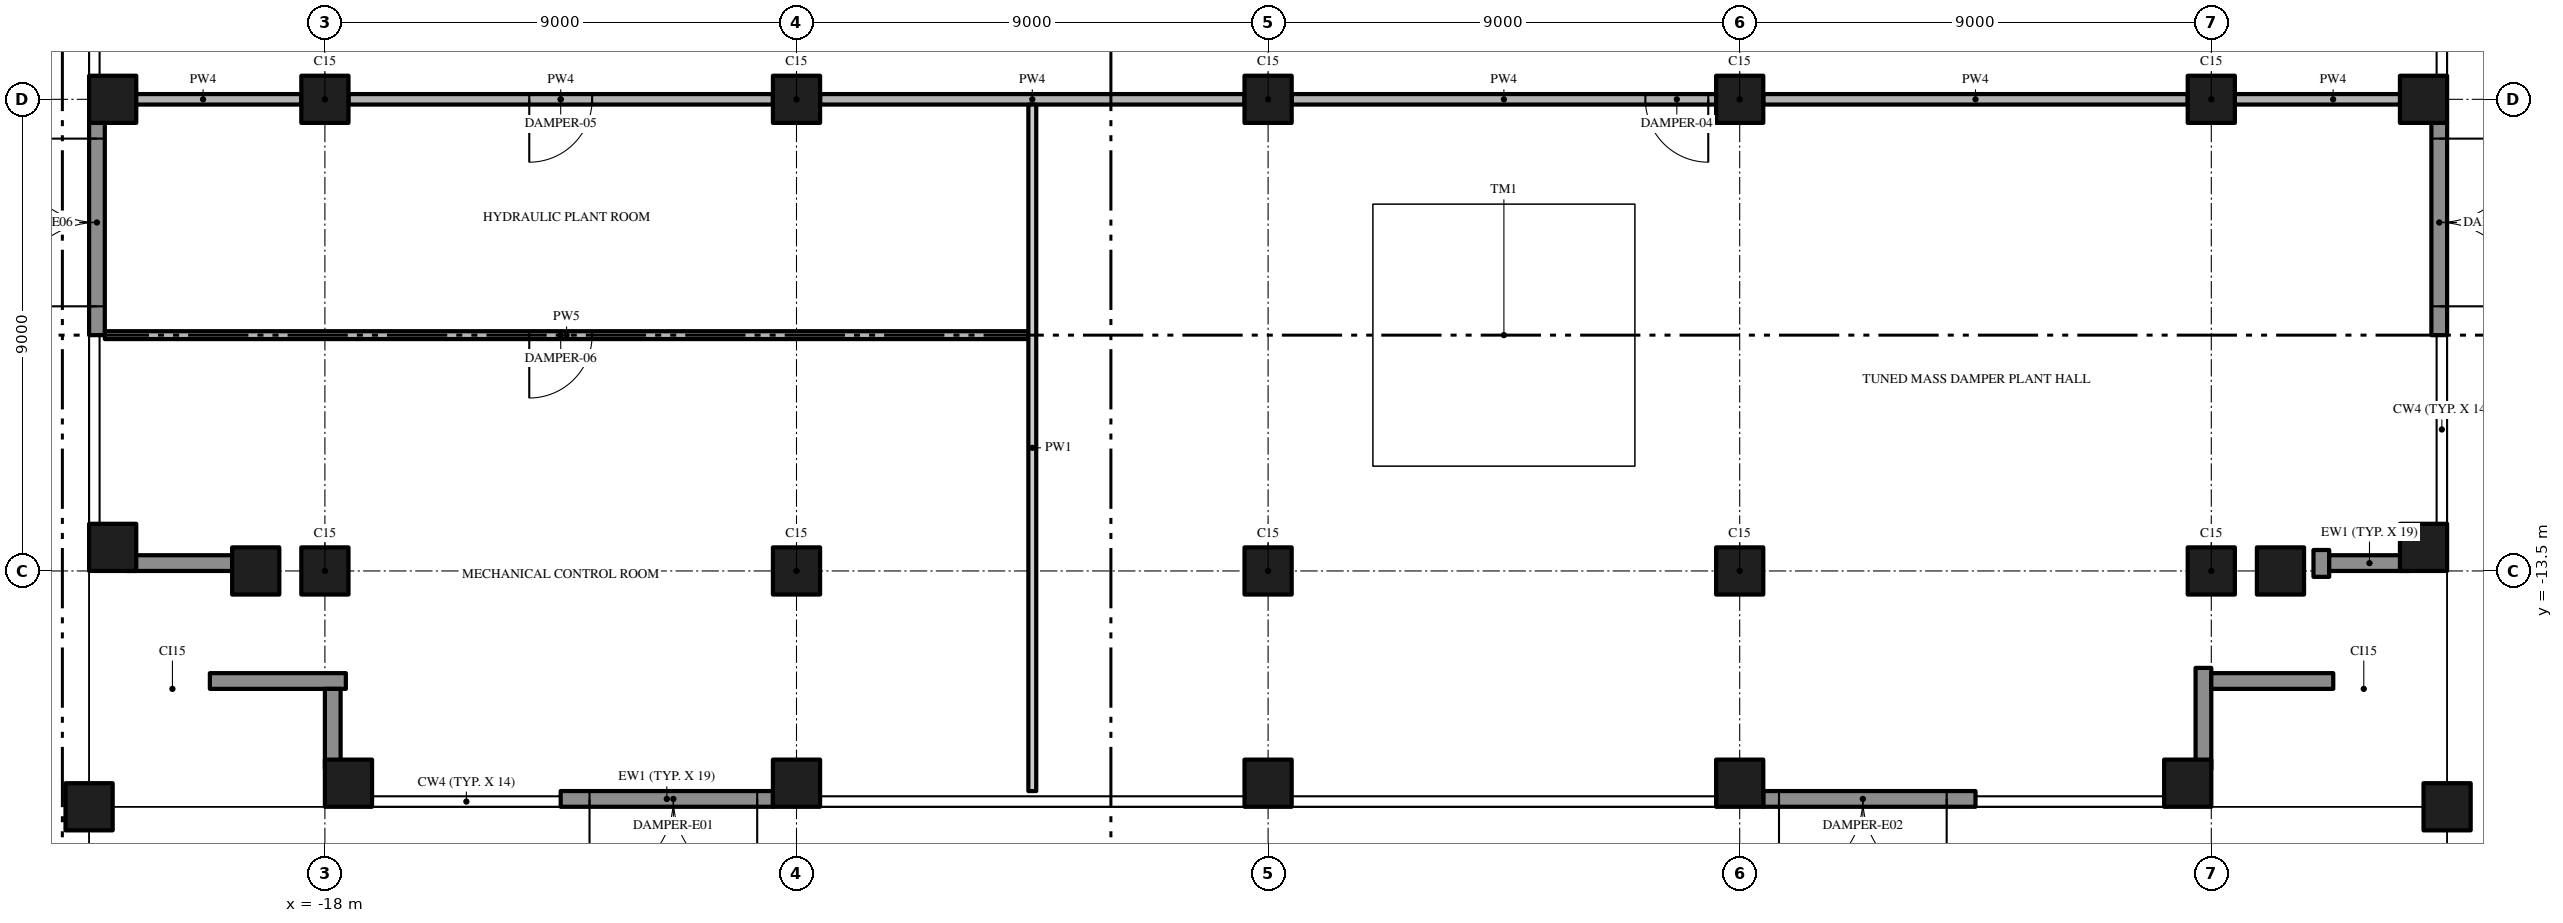
"""IFC4 building model, lengths in metres.
Left out: names, types, materials, properties, quantities, classifications, styles, units other than length and angle.
Written with IfcOpenShell. Run it as: python <this file> out.ifc"""

import sys

from ifc_helpers import new_model, si_unit, direction, frame, frame_2d, origin, origin_2d, place, context, subcontext, project, spatial, rectangle, extrude, element, fill, save


model = new_model("IFC4")
c1 = context("Model", 3, precision=1e-05, world=origin(), true_north=direction((0.0, 1.0)))
c2 = subcontext(c1, "Body", "Model", "MODEL_VIEW")
j1 = project(units=[si_unit("LENGTHUNIT", "METRE"), si_unit("PLANEANGLEUNIT", "RADIAN")], contexts=[c1])
p1 = place(None, origin())
s1 = spatial("IfcSite", under=j1, at=p1, CompositionType="ELEMENT")
p2 = place(p1, origin())
s2 = spatial("IfcBuilding", under=s1, at=p2, CompositionType="ELEMENT")
p3 = place(p2, frame((0.0, 0.0, 289.4)))
s3 = spatial("IfcBuildingStorey", under=s2, at=p3, CompositionType="ELEMENT", Elevation=289.4)
p4 = place(p3, frame((-18.0, -13.5, 0.0), z_axis=(0.0, 0.0, 1.0), x_axis=(1.0, 0.0, 0.0)))
e1 = element("IfcColumn", 1, at=p4, inside=s3, PredefinedType="COLUMN", context=c2, shape_type="SweptSolid", body=[
    extrude(rectangle(XDim=0.9, YDim=0.9, at=origin_2d()), origin(), (0.0, 0.0, 1.0), 7.7),
])
p5 = place(p3, frame((-18.0, -22.05, 0.0), z_axis=(0.050392695604, 0.503926956042, 0.862275013672), x_axis=(-0.99503719021, 0.099503719021, 0.0)))
e2 = element("IfcColumn", 2, at=p5, inside=s3, PredefinedType="COLUMN", context=c2, shape_type="SweptSolid", body=[
    extrude(rectangle(XDim=0.9, YDim=0.9, at=origin_2d()), origin(), (0.0, 0.0, 1.0), 8.93),
])
p6 = place(p3, frame((-18.0, -4.5, 0.0), z_axis=(0.0, 0.0, 1.0), x_axis=(1.0, 0.0, 0.0)))
e3 = element("IfcColumn", 3, at=p6, inside=s3, PredefinedType="COLUMN", context=c2, shape_type="SweptSolid", body=[
    extrude(rectangle(XDim=0.9, YDim=0.9, at=origin_2d()), origin(), (0.0, 0.0, 1.0), 7.7),
])
p7 = place(p3, frame((-26.55, -13.5, 0.0), z_axis=(0.503926956042, 0.050392695604, 0.862275013672), x_axis=(-0.099503719021, 0.99503719021, 0.0)))
e4 = element("IfcColumn", 4, at=p7, inside=s3, PredefinedType="COLUMN", context=c2, shape_type="SweptSolid", body=[
    extrude(rectangle(XDim=0.9, YDim=0.9, at=origin_2d()), origin(), (0.0, 0.0, 1.0), 8.93),
])
p8 = place(p3, frame((-22.5, -18.0, 0.0), z_axis=(0.335850624288, 0.475260317388, 0.813223209753), x_axis=(-0.816665981071, 0.577110626623, 0.0)))
e5 = element("IfcColumn", 5, at=p8, inside=s3, PredefinedType="COLUMN", context=c2, shape_type="SweptSolid", body=[
    extrude(rectangle(XDim=0.9, YDim=0.9, at=origin_2d()), origin(), (0.0, 0.0, 1.0), 9.468),
])
p9 = place(p3, frame((-26.55, -4.5, 0.0), z_axis=(0.504568019295, 0.0, 0.863371944127), x_axis=(0.0, 1.0, 0.0)))
e6 = element("IfcColumn", 6, at=p9, inside=s3, PredefinedType="COLUMN", context=c2, shape_type="SweptSolid", body=[
    extrude(rectangle(XDim=0.9, YDim=0.9, at=origin_2d()), origin(), (0.0, 0.0, 1.0), 8.919),
])
p10 = place(p3, frame((-9.0, -13.5, 0.0), z_axis=(0.0, 0.0, 1.0), x_axis=(1.0, 0.0, 0.0)))
e7 = element("IfcColumn", 7, at=p10, inside=s3, PredefinedType="COLUMN", context=c2, shape_type="SweptSolid", body=[
    extrude(rectangle(XDim=0.9, YDim=0.9, at=origin_2d()), origin(), (0.0, 0.0, 1.0), 7.7),
])
p11 = place(p3, frame((-9.0, -22.05, 0.0), z_axis=(0.0, 0.504568019295, 0.863371944127), x_axis=(-1.0, 0.0, 0.0)))
e8 = element("IfcColumn", 8, at=p11, inside=s3, PredefinedType="COLUMN", context=c2, shape_type="SweptSolid", body=[
    extrude(rectangle(XDim=0.9, YDim=0.9, at=origin_2d()), origin(), (0.0, 0.0, 1.0), 8.919),
])
for number, where, z_axis, x_axis in (
    (9, (-9.0, -4.5, 0.0), (0.0, 0.0, 1.0), (1.0, 0.0, 0.0)),
    (10, (0.0, -13.5, 0.0), (0.0, 0.0, 1.0), (1.0, 0.0, 0.0)),
):
    element("IfcColumn", number, at=place(p3, frame(where, z_axis=z_axis, x_axis=x_axis)), inside=s3, PredefinedType="COLUMN", context=c2, shape_type="SweptSolid", body=[
        extrude(rectangle(XDim=0.9, YDim=0.9, at=origin_2d()), origin(), (0.0, 0.0, 1.0), 7.7),
    ])
p12 = place(p3, frame((0.0, -22.05, 0.0), z_axis=(0.0, 0.504568019295, 0.863371944127), x_axis=(-1.0, 0.0, 0.0)))
e11 = element("IfcColumn", 11, at=p12, inside=s3, PredefinedType="COLUMN", context=c2, shape_type="SweptSolid", body=[
    extrude(rectangle(XDim=0.9, YDim=0.9, at=origin_2d()), origin(), (0.0, 0.0, 1.0), 8.919),
])
for number, where, z_axis, x_axis in (
    (12, (0.0, -4.5, 0.0), (0.0, 0.0, 1.0), (1.0, 0.0, 0.0)),
    (13, (18.0, -13.5, 0.0), (0.0, 0.0, 1.0), (1.0, 0.0, 0.0)),
):
    element("IfcColumn", number, at=place(p3, frame(where, z_axis=z_axis, x_axis=x_axis)), inside=s3, PredefinedType="COLUMN", context=c2, shape_type="SweptSolid", body=[
        extrude(rectangle(XDim=0.9, YDim=0.9, at=origin_2d()), origin(), (0.0, 0.0, 1.0), 7.7),
    ])
p13 = place(p3, frame((18.0, -22.05, 0.0), z_axis=(-0.050392695604, 0.503926956042, 0.862275013672), x_axis=(-0.99503719021, -0.099503719021, 0.0)))
e14 = element("IfcColumn", 14, at=p13, inside=s3, PredefinedType="COLUMN", context=c2, shape_type="SweptSolid", body=[
    extrude(rectangle(XDim=0.9, YDim=0.9, at=origin_2d()), origin(), (0.0, 0.0, 1.0), 8.93),
])
p14 = place(p3, frame((18.0, -4.5, 0.0), z_axis=(0.0, 0.0, 1.0), x_axis=(1.0, 0.0, 0.0)))
e15 = element("IfcColumn", 15, at=p14, inside=s3, PredefinedType="COLUMN", context=c2, shape_type="SweptSolid", body=[
    extrude(rectangle(XDim=0.9, YDim=0.9, at=origin_2d()), origin(), (0.0, 0.0, 1.0), 7.7),
])
p15 = place(p3, frame((26.55, -13.5, 0.0), z_axis=(-0.503926956042, 0.050392695604, 0.862275013672), x_axis=(-0.099503719021, -0.99503719021, 0.0)))
e16 = element("IfcColumn", 16, at=p15, inside=s3, PredefinedType="COLUMN", context=c2, shape_type="SweptSolid", body=[
    extrude(rectangle(XDim=0.9, YDim=0.9, at=origin_2d()), origin(), (0.0, 0.0, 1.0), 8.93),
])
p16 = place(p3, frame((22.5, -18.0, 0.0), z_axis=(-0.335850624288, 0.475260317388, 0.813223209753), x_axis=(-0.816665981071, -0.577110626623, 0.0)))
e17 = element("IfcColumn", 17, at=p16, inside=s3, PredefinedType="COLUMN", context=c2, shape_type="SweptSolid", body=[
    extrude(rectangle(XDim=0.9, YDim=0.9, at=origin_2d()), origin(), (0.0, 0.0, 1.0), 9.468),
])
p17 = place(p3, frame((26.55, -4.5, 0.0), z_axis=(-0.504568019295, 0.0, 0.863371944127), x_axis=(0.0, -1.0, 0.0)))
e18 = element("IfcColumn", 18, at=p17, inside=s3, PredefinedType="COLUMN", context=c2, shape_type="SweptSolid", body=[
    extrude(rectangle(XDim=0.9, YDim=0.9, at=origin_2d()), origin(), (0.0, 0.0, 1.0), 8.919),
])
p18 = place(p3, frame((9.0, -13.5, 0.0), z_axis=(0.0, 0.0, 1.0), x_axis=(1.0, 0.0, 0.0)))
e19 = element("IfcColumn", 19, at=p18, inside=s3, PredefinedType="COLUMN", context=c2, shape_type="SweptSolid", body=[
    extrude(rectangle(XDim=0.9, YDim=0.9, at=origin_2d()), origin(), (0.0, 0.0, 1.0), 7.7),
])
p19 = place(p3, frame((9.0, -22.05, 0.0), z_axis=(0.0, 0.504568019295, 0.863371944127), x_axis=(-1.0, 0.0, 0.0)))
e20 = element("IfcColumn", 20, at=p19, inside=s3, PredefinedType="COLUMN", context=c2, shape_type="SweptSolid", body=[
    extrude(rectangle(XDim=0.9, YDim=0.9, at=origin_2d()), origin(), (0.0, 0.0, 1.0), 8.919),
])
p20 = place(p3, frame((9.0, -4.5, 0.0), z_axis=(0.0, 0.0, 1.0), x_axis=(1.0, 0.0, 0.0)))
e21 = element("IfcColumn", 21, at=p20, inside=s3, PredefinedType="COLUMN", context=c2, shape_type="SweptSolid", body=[
    extrude(rectangle(XDim=0.9, YDim=0.9, at=origin_2d()), origin(), (0.0, 0.0, 1.0), 7.7),
])
p21 = place(p3, frame((-9.45, -17.85, 0.0), z_axis=(0.0, 0.0, 1.0), x_axis=(-1.0, 0.0, 0.0)))
e22 = element("IfcWall", 22, at=p21, inside=s3, PredefinedType="SOLIDWALL", context=c2, shape_type="SweptSolid", body=[
    extrude(rectangle(XDim=4.05, YDim=0.3, at=frame_2d((2.025, 0.0))), origin(), (0.0, 0.0, 1.0), 7.7),
])
p22 = place(p21, frame((0.3, 0.0, 0.0)))
e23 = element("IfcOpeningElement", 23, at=p22, cuts=e22, PredefinedType="OPENING", context=c2, shape_type="SweptSolid", body=[
    extrude(rectangle(XDim=3.2, YDim=2.4, at=frame_2d((1.6, 1.2))), frame((0.0, 0.16, 0.0), z_axis=(0.0, -1.0, 0.0), x_axis=(1.0, 0.0, 0.0)), (0.0, 0.0, 1.0), 0.32),
])
p23 = place(p3, frame((13.5, -17.85, 0.0), z_axis=(0.0, 0.0, 1.0), x_axis=(-1.0, 0.0, 0.0)))
e24 = element("IfcWall", 24, at=p23, inside=s3, PredefinedType="SOLIDWALL", context=c2, shape_type="SweptSolid", body=[
    extrude(rectangle(XDim=4.05, YDim=0.3, at=frame_2d((2.025, 0.0))), origin(), (0.0, 0.0, 1.0), 7.7),
])
p24 = place(p23, frame((0.55, 0.0, 0.0)))
e25 = element("IfcOpeningElement", 25, at=p24, cuts=e24, PredefinedType="OPENING", context=c2, shape_type="SweptSolid", body=[
    extrude(rectangle(XDim=3.2, YDim=2.4, at=frame_2d((1.6, 1.2))), frame((0.0, 0.16, 0.0), z_axis=(0.0, -1.0, 0.0), x_axis=(1.0, 0.0, 0.0)), (0.0, 0.0, 1.0), 0.32),
])
p25 = place(p3, frame((17.85, -15.35, 0.0), z_axis=(0.0, 0.0, 1.0), x_axis=(0.0, -1.0, 0.0)))
e26 = element("IfcWall", 26, at=p25, inside=s3, PredefinedType="SOLIDWALL", context=c2, shape_type="SweptSolid", body=[
    extrude(rectangle(XDim=1.938, YDim=0.3, at=frame_2d((0.969, 0.0))), origin(), (0.0, 0.0, 1.0), 7.7),
])
p26 = place(p3, frame((20.328, -15.6, 0.0), z_axis=(0.0, 0.0, 1.0), x_axis=(-1.0, 0.0, 0.0)))
e27 = element("IfcWall", 27, at=p26, inside=s3, PredefinedType="SOLIDWALL", context=c2, shape_type="SweptSolid", body=[
    extrude(rectangle(XDim=2.328, YDim=0.3, at=frame_2d((1.164, 0.0))), origin(), (0.0, 0.0, 1.0), 7.7),
])
p27 = place(p3, frame((20.1, -13.1, 0.0), z_axis=(0.0, 0.0, 1.0), x_axis=(0.0, -1.0, 0.0)))
e28 = element("IfcWall", 28, at=p27, inside=s3, PredefinedType="SOLIDWALL", context=c2, shape_type="SweptSolid", body=[
    extrude(rectangle(XDim=0.512, YDim=0.3, at=frame_2d((0.256, 0.0))), origin(), (0.0, 0.0, 1.0), 7.7),
])
p28 = place(p3, frame((21.788, -13.35, 0.0), z_axis=(0.0, 0.0, 1.0), x_axis=(-1.0, 0.0, 0.0)))
e29 = element("IfcWall", 29, at=p28, inside=s3, PredefinedType="SOLIDWALL", context=c2, shape_type="SweptSolid", body=[
    extrude(rectangle(XDim=1.538, YDim=0.3, at=frame_2d((0.769, 0.0))), origin(), (0.0, 0.0, 1.0), 7.7),
])
p29 = place(p3, frame((22.35, -4.95, 0.0), z_axis=(0.0, 0.0, 1.0), x_axis=(0.0, -1.0, 0.0)))
e30 = element("IfcWall", 30, at=p29, inside=s3, PredefinedType="SOLIDWALL", context=c2, shape_type="SweptSolid", body=[
    extrude(rectangle(XDim=4.05, YDim=0.3, at=frame_2d((2.025, 0.0))), origin(), (0.0, 0.0, 1.0), 7.7),
])
p30 = place(p29, frame((0.3, 0.0, 0.0)))
e31 = element("IfcOpeningElement", 31, at=p30, cuts=e30, PredefinedType="OPENING", context=c2, shape_type="SweptSolid", body=[
    extrude(rectangle(XDim=3.2, YDim=2.4, at=frame_2d((1.6, 1.2))), frame((0.0, 0.16, 0.0), z_axis=(0.0, -1.0, 0.0), x_axis=(1.0, 0.0, 0.0)), (0.0, 0.0, 1.0), 0.32),
])
p31 = place(p3, frame((-22.35, -9.0, 0.0), z_axis=(0.0, 0.0, 1.0), x_axis=(0.0, 1.0, 0.0)))
e32 = element("IfcWall", 32, at=p31, inside=s3, PredefinedType="SOLIDWALL", context=c2, shape_type="SweptSolid", body=[
    extrude(rectangle(XDim=4.05, YDim=0.3, at=frame_2d((2.025, 0.0))), origin(), (0.0, 0.0, 1.0), 7.7),
])
p32 = place(p31, frame((0.55, 0.0, 0.0)))
e33 = element("IfcOpeningElement", 33, at=p32, cuts=e32, PredefinedType="OPENING", context=c2, shape_type="SweptSolid", body=[
    extrude(rectangle(XDim=3.2, YDim=2.4, at=frame_2d((1.6, 1.2))), frame((0.0, 0.16, 0.0), z_axis=(0.0, -1.0, 0.0), x_axis=(1.0, 0.0, 0.0)), (0.0, 0.0, 1.0), 0.32),
])
p33 = place(p3, frame((-19.77, -13.35, 0.0), z_axis=(0.0, 0.0, 1.0), x_axis=(-1.0, 0.0, 0.0)))
e34 = element("IfcWall", 34, at=p33, inside=s3, PredefinedType="SOLIDWALL", context=c2, shape_type="SweptSolid", body=[
    extrude(rectangle(XDim=2.018, YDim=0.3, at=frame_2d((1.009, 0.0))), origin(), (0.0, 0.0, 1.0), 7.7),
])
p34 = place(p3, frame((-17.6, -15.6, 0.0), z_axis=(0.0, 0.0, 1.0), x_axis=(-1.0, 0.0, 0.0)))
e35 = element("IfcWall", 35, at=p34, inside=s3, PredefinedType="SOLIDWALL", context=c2, shape_type="SweptSolid", body=[
    extrude(rectangle(XDim=2.595, YDim=0.3, at=frame_2d((1.298, 0.0))), origin(), (0.0, 0.0, 1.0), 7.7),
])
p35 = place(p3, frame((-17.85, -17.288, 0.0), z_axis=(0.0, 0.0, 1.0), x_axis=(0.0, 1.0, 0.0)))
e36 = element("IfcWall", 36, at=p35, inside=s3, PredefinedType="SOLIDWALL", context=c2, shape_type="SweptSolid", body=[
    extrude(rectangle(XDim=1.538, YDim=0.3, at=frame_2d((0.769, 0.0))), origin(), (0.0, 0.0, 1.0), 7.7),
])
p36 = place(p3, frame((-4.575, -9.0, 0.0), z_axis=(0.0, 0.0, 1.0), x_axis=(-1.0, 0.0, 0.0)))
e37 = element("IfcWall", 37, at=p36, inside=s3, PredefinedType="PARTITIONING", context=c2, shape_type="SweptSolid", body=[
    extrude(rectangle(XDim=17.625, YDim=0.15, at=frame_2d((8.812, 0.0))), origin(), (0.0, 0.0, 1.0), 7.7),
])
p37 = place(p36, frame((8.325, 0.0, 0.0)))
e38 = element("IfcOpeningElement", 38, at=p37, cuts=e37, PredefinedType="OPENING", context=c2, shape_type="SweptSolid", body=[
    extrude(rectangle(XDim=1.2, YDim=2.4, at=frame_2d((0.6, 1.2))), frame((0.0, 0.085, 0.0), z_axis=(0.0, -1.0, 0.0), x_axis=(1.0, 0.0, 0.0)), (0.0, 0.0, 1.0), 0.17),
])
p38 = place(p3, frame((-22.2, -4.5, 0.0), z_axis=(0.0, 0.0, 1.0), x_axis=(1.0, 0.0, 0.0)))
e39 = element("IfcWall", 39, at=p38, inside=s3, PredefinedType="PARTITIONING", context=c2, shape_type="SweptSolid", body=[
    extrude(rectangle(XDim=3.75, YDim=0.2, at=frame_2d((1.875, 0.0))), origin(), (0.0, 0.0, 1.0), 7.7),
])
p39 = place(p3, frame((-9.45, -4.5, 0.0), z_axis=(0.0, 0.0, 1.0), x_axis=(-1.0, 0.0, 0.0)))
e40 = element("IfcWall", 40, at=p39, inside=s3, PredefinedType="PARTITIONING", context=c2, shape_type="SweptSolid", body=[
    extrude(rectangle(XDim=8.1, YDim=0.2, at=frame_2d((4.05, 0.0))), origin(), (0.0, 0.0, 1.0), 7.7),
])
p40 = place(p39, frame((3.45, 0.0, 0.0)))
e41 = element("IfcOpeningElement", 41, at=p40, cuts=e40, PredefinedType="OPENING", context=c2, shape_type="SweptSolid", body=[
    extrude(rectangle(XDim=1.2, YDim=2.4, at=frame_2d((0.6, 1.2))), frame((0.0, 0.11, 0.0), z_axis=(0.0, -1.0, 0.0), x_axis=(1.0, 0.0, 0.0)), (0.0, 0.0, 1.0), 0.22),
])
p41 = place(p3, frame((-8.55, -4.5, 0.0), z_axis=(0.0, 0.0, 1.0), x_axis=(1.0, 0.0, 0.0)))
e42 = element("IfcWall", 42, at=p41, inside=s3, PredefinedType="PARTITIONING", context=c2, shape_type="SweptSolid", body=[
    extrude(rectangle(XDim=8.1, YDim=0.2, at=frame_2d((4.05, 0.0))), origin(), (0.0, 0.0, 1.0), 7.7),
])
p42 = place(p3, frame((8.55, -4.5, 0.0), z_axis=(0.0, 0.0, 1.0), x_axis=(-1.0, 0.0, 0.0)))
e43 = element("IfcWall", 43, at=p42, inside=s3, PredefinedType="PARTITIONING", context=c2, shape_type="SweptSolid", body=[
    extrude(rectangle(XDim=8.1, YDim=0.2, at=frame_2d((4.05, 0.0))), origin(), (0.0, 0.0, 1.0), 7.7),
])
p43 = place(p42, frame((0.15, 0.0, 0.0)))
e44 = element("IfcOpeningElement", 44, at=p43, cuts=e43, PredefinedType="OPENING", context=c2, shape_type="SweptSolid", body=[
    extrude(rectangle(XDim=1.2, YDim=2.4, at=frame_2d((0.6, 1.2))), frame((0.0, 0.11, 0.0), z_axis=(0.0, -1.0, 0.0), x_axis=(1.0, 0.0, 0.0)), (0.0, 0.0, 1.0), 0.22),
])
p44 = place(p3, frame((9.45, -4.5, 0.0), z_axis=(0.0, 0.0, 1.0), x_axis=(1.0, 0.0, 0.0)))
e45 = element("IfcWall", 45, at=p44, inside=s3, PredefinedType="PARTITIONING", context=c2, shape_type="SweptSolid", body=[
    extrude(rectangle(XDim=8.1, YDim=0.2, at=frame_2d((4.05, 0.0))), origin(), (0.0, 0.0, 1.0), 7.7),
])
p45 = place(p3, frame((18.45, -4.5, 0.0), z_axis=(0.0, 0.0, 1.0), x_axis=(1.0, 0.0, 0.0)))
e46 = element("IfcWall", 46, at=p45, inside=s3, PredefinedType="PARTITIONING", context=c2, shape_type="SweptSolid", body=[
    extrude(rectangle(XDim=3.75, YDim=0.2, at=frame_2d((1.875, 0.0))), origin(), (0.0, 0.0, 1.0), 7.7),
])
p46 = place(p3, frame((-4.5, -17.7, 0.0), z_axis=(0.0, 0.0, 1.0), x_axis=(0.0, 1.0, 0.0)))
e47 = element("IfcWall", 47, at=p46, inside=s3, PredefinedType="PARTITIONING", context=c2, shape_type="SweptSolid", body=[
    extrude(rectangle(XDim=13.1, YDim=0.15, at=frame_2d((6.55, 0.0))), origin(), (0.0, 0.0, 1.0), 7.7),
])
p47 = place(p22, origin())
e48 = element("IfcDoor", 48, at=p47, inside=s3, OperationType="SINGLE_SWING_LEFT", PredefinedType="DOOR", context=c2, shape_type="SweptSolid", body=[
    extrude(rectangle(XDim=3.2, YDim=2.4, at=frame_2d((1.6, 1.2))), frame((0.0, 0.025, 0.0), z_axis=(0.0, -1.0, 0.0), x_axis=(1.0, 0.0, 0.0)), (0.0, 0.0, 1.0), 0.05),
])
fill(e23, e48)
p48 = place(p24, origin())
e49 = element("IfcDoor", 49, at=p48, inside=s3, OperationType="SINGLE_SWING_LEFT", PredefinedType="DOOR", context=c2, shape_type="SweptSolid", body=[
    extrude(rectangle(XDim=3.2, YDim=2.4, at=frame_2d((1.6, 1.2))), frame((0.0, 0.025, 0.0), z_axis=(0.0, -1.0, 0.0), x_axis=(1.0, 0.0, 0.0)), (0.0, 0.0, 1.0), 0.05),
])
fill(e25, e49)
p49 = place(p30, origin())
e50 = element("IfcDoor", 50, at=p49, inside=s3, OperationType="SINGLE_SWING_LEFT", PredefinedType="DOOR", context=c2, shape_type="SweptSolid", body=[
    extrude(rectangle(XDim=3.2, YDim=2.4, at=frame_2d((1.6, 1.2))), frame((0.0, 0.025, 0.0), z_axis=(0.0, -1.0, 0.0), x_axis=(1.0, 0.0, 0.0)), (0.0, 0.0, 1.0), 0.05),
])
fill(e31, e50)
p50 = place(p32, origin())
e51 = element("IfcDoor", 51, at=p50, inside=s3, OperationType="SINGLE_SWING_LEFT", PredefinedType="DOOR", context=c2, shape_type="SweptSolid", body=[
    extrude(rectangle(XDim=3.2, YDim=2.4, at=frame_2d((1.6, 1.2))), frame((0.0, 0.025, 0.0), z_axis=(0.0, -1.0, 0.0), x_axis=(1.0, 0.0, 0.0)), (0.0, 0.0, 1.0), 0.05),
])
fill(e33, e51)
p51 = place(p43, origin())
e52 = element("IfcDoor", 52, at=p51, inside=s3, OperationType="SINGLE_SWING_LEFT", PredefinedType="DOOR", context=c2, shape_type="SweptSolid", body=[
    extrude(rectangle(XDim=1.2, YDim=2.4, at=frame_2d((0.6, 1.2))), frame((0.0, 0.025, 0.0), z_axis=(0.0, -1.0, 0.0), x_axis=(1.0, 0.0, 0.0)), (0.0, 0.0, 1.0), 0.05),
])
fill(e44, e52)
p52 = place(p40, origin())
e53 = element("IfcDoor", 53, at=p52, inside=s3, OperationType="SINGLE_SWING_RIGHT", PredefinedType="DOOR", context=c2, shape_type="SweptSolid", body=[
    extrude(rectangle(XDim=1.2, YDim=2.4, at=frame_2d((0.6, 1.2))), frame((0.0, 0.025, 0.0), z_axis=(0.0, -1.0, 0.0), x_axis=(1.0, 0.0, 0.0)), (0.0, 0.0, 1.0), 0.05),
])
fill(e41, e53)
p53 = place(p37, origin())
e54 = element("IfcDoor", 54, at=p53, inside=s3, OperationType="SINGLE_SWING_RIGHT", PredefinedType="DOOR", context=c2, shape_type="SweptSolid", body=[
    extrude(rectangle(XDim=1.2, YDim=2.4, at=frame_2d((0.6, 1.2))), frame((0.0, 0.025, 0.0), z_axis=(0.0, -1.0, 0.0), x_axis=(1.0, 0.0, 0.0)), (0.0, 0.0, 1.0), 0.05),
])
fill(e38, e54)
save(model, sys.argv[1])
